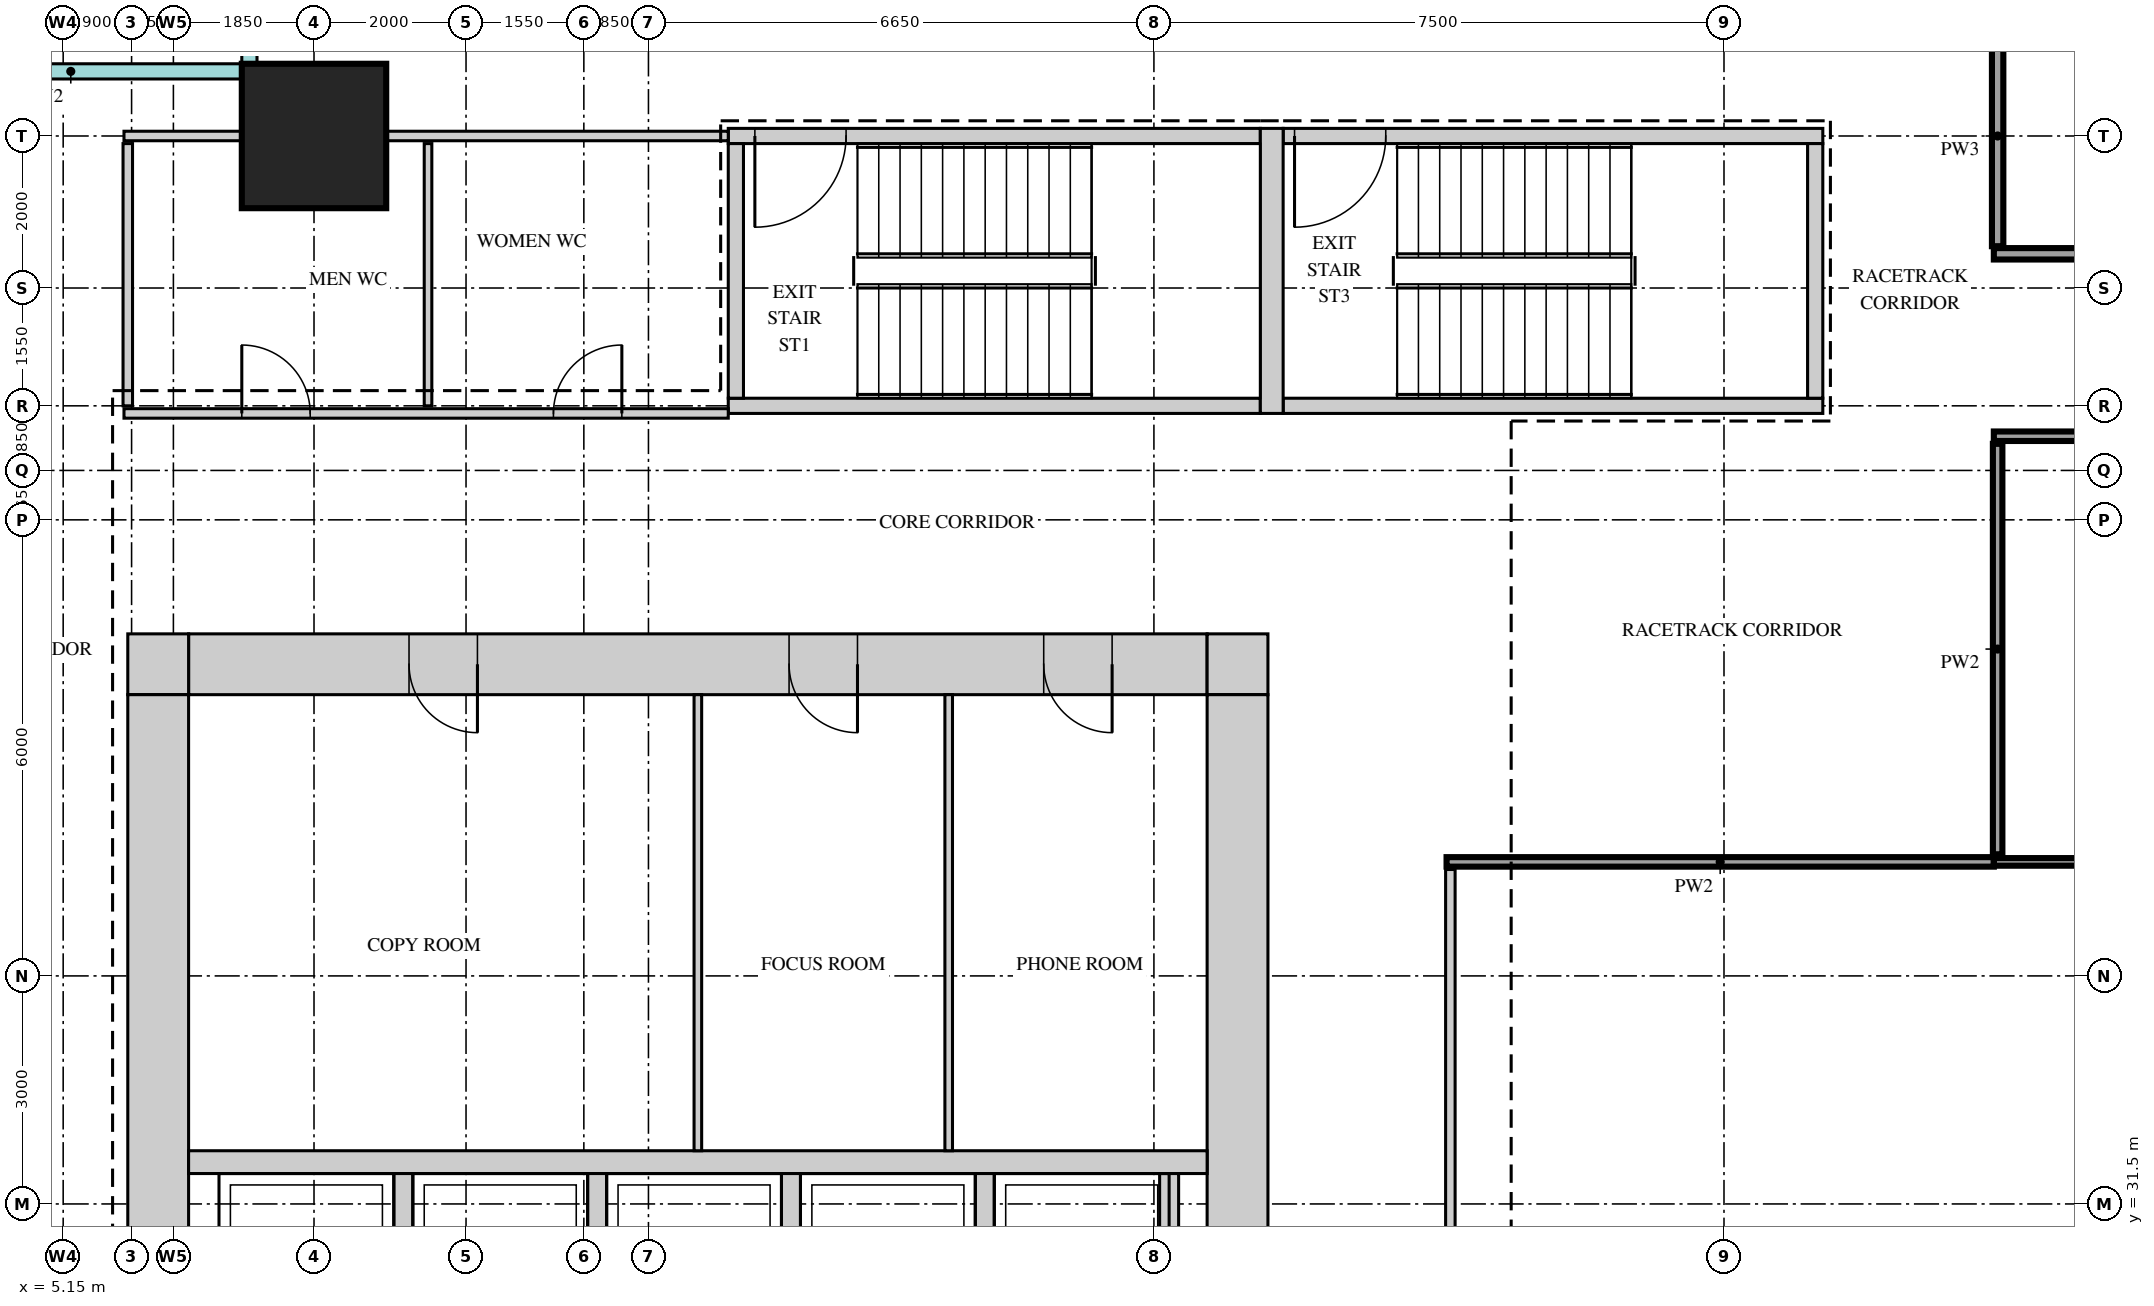
"""IFC4 building model, lengths in metres.
Left out: names, types, materials, properties, quantities, classifications, styles, units other than length and angle.
Written with IfcOpenShell. Run it as: python <this file> out.ifc"""

import sys

from ifc_helpers import new_model, si_unit, direction, frame, frame_2d, origin, origin_2d, place, context, subcontext, project, spatial, rectangle, extrude, source, transform, mapped, element, fill, save


model = new_model("IFC4")
c1 = context("Model", 3, precision=1e-05, world=origin(), true_north=direction((0.0, 1.0)))
c2 = subcontext(c1, "Body", "Model", "MODEL_VIEW")
j1 = project(units=[si_unit("LENGTHUNIT", "METRE"), si_unit("PLANEANGLEUNIT", "RADIAN")], contexts=[c1])
p1 = place(None, origin())
s1 = spatial("IfcSite", under=j1, at=p1, CompositionType="ELEMENT")
p2 = place(p1, origin())
s2 = spatial("IfcBuilding", under=s1, at=p2, CompositionType="ELEMENT")
p3 = place(p2, frame((0.0, 0.0, 208.7)))
s3 = spatial("IfcBuildingStorey", under=s2, at=p3, CompositionType="ELEMENT", Elevation=208.7)
m1 = source(origin(), c2, "Body", "SweptSolid", [
    extrude(rectangle(XDim=13.4, YDim=0.8, at=frame_2d((6.7, 0.0))), origin(), (0.0, 0.0, 1.0), 3.75),
])
p4 = place(p3, frame((6.8, 38.6, 0.0), z_axis=(0.0, 0.0, 1.0), x_axis=(1.0, 0.0, 0.0)))
e1 = element("IfcWall", 1, at=p4, inside=s3, PredefinedType="SHEAR", context=c2, shape_type="MappedRepresentation", body=[
    mapped(m1, transform((0.0, 0.0, 0.0))),
])
m2 = source(origin(), c2, "Body", "SweptSolid", [
    extrude(rectangle(XDim=0.9, YDim=2.1, at=frame_2d((0.45, 1.05))), frame((0.0, 0.41, 0.0), z_axis=(0.0, -1.0, 0.0), x_axis=(1.0, 0.0, 0.0)), (0.0, 0.0, 1.0), 0.82),
])
p5 = place(p4, frame((2.9, 0.0, 0.0)))
e2 = element("IfcOpeningElement", 2, at=p5, cuts=e1, PredefinedType="OPENING", context=c2, shape_type="MappedRepresentation", body=[
    mapped(m2, transform((0.0, 0.0, 0.0))),
])
p6 = place(p4, frame((7.9, 0.0, 0.0)))
e3 = element("IfcOpeningElement", 3, at=p6, cuts=e1, PredefinedType="OPENING", context=c2, shape_type="MappedRepresentation", body=[
    mapped(m2, transform((0.0, 0.0, 0.0))),
])
p7 = place(p4, frame((11.25, 0.0, 0.0)))
e4 = element("IfcOpeningElement", 4, at=p7, cuts=e1, PredefinedType="OPENING", context=c2, shape_type="MappedRepresentation", body=[
    mapped(m2, transform((0.0, 0.0, 0.0))),
])
m3 = source(origin(), c2, "Body", "SweptSolid", [
    extrude(rectangle(XDim=0.8, YDim=0.8, at=frame_2d((0.4, 0.0))), origin(), (0.0, 0.0, 1.0), 3.75),
])
for number, where, z_axis, x_axis in (
    (5, (20.2, 38.6, 0.0), (0.0, 0.0, 1.0), (1.0, 0.0, 0.0)),
    (6, (6.0, 38.6, 0.0), (0.0, 0.0, 1.0), (1.0, 0.0, 0.0)),
):
    element("IfcWall", number, at=place(p3, frame(where, z_axis=z_axis, x_axis=x_axis)), inside=s3, PredefinedType="SHEAR", context=c2, shape_type="MappedRepresentation", body=[
        mapped(m3, transform((0.0, 0.0, 0.0))),
    ])
m4 = source(origin(), c2, "Body", "SweptSolid", [
    extrude(rectangle(XDim=22.4, YDim=0.8, at=frame_2d((11.2, 0.0))), origin(), (0.0, 0.0, 1.0), 3.75),
])
p8 = place(p3, frame((20.6, 15.8, 0.0), z_axis=(0.0, 0.0, 1.0), x_axis=(0.0, 1.0, 0.0)))
e7 = element("IfcWall", 7, at=p8, inside=s3, PredefinedType="SHEAR", context=c2, shape_type="MappedRepresentation", body=[
    mapped(m4, transform((0.0, 0.0, 0.0))),
])
m5 = source(origin(), c2, "Body", "SweptSolid", [
    extrude(rectangle(XDim=1.8, YDim=2.1, at=frame_2d((0.9, 1.05))), frame((0.0, 0.41, 0.0), z_axis=(0.0, -1.0, 0.0), x_axis=(1.0, 0.0, 0.0)), (0.0, 0.0, 1.0), 0.82),
])
p9 = place(p8, frame((10.7, 0.0, 0.0)))
e8 = element("IfcOpeningElement", 8, at=p9, cuts=e7, PredefinedType="OPENING", context=c2, shape_type="MappedRepresentation", body=[
    mapped(m5, transform((0.0, 0.0, 0.0))),
])
p10 = place(p8, frame((0.35, 0.0, 0.0)))
e9 = element("IfcOpeningElement", 9, at=p10, cuts=e7, PredefinedType="OPENING", context=c2, shape_type="MappedRepresentation", body=[
    mapped(m2, transform((0.0, 0.0, 0.0))),
])
p11 = place(p8, frame((3.9, 0.0, 0.0)))
e10 = element("IfcOpeningElement", 10, at=p11, cuts=e7, PredefinedType="OPENING", context=c2, shape_type="MappedRepresentation", body=[
    mapped(m2, transform((0.0, 0.0, 0.0))),
])
p12 = place(p3, frame((6.4, 15.8, 0.0), z_axis=(0.0, 0.0, 1.0), x_axis=(0.0, 1.0, 0.0)))
e11 = element("IfcWall", 11, at=p12, inside=s3, PredefinedType="SHEAR", context=c2, shape_type="MappedRepresentation", body=[
    mapped(m4, transform((0.0, 0.0, 0.0))),
])
m6 = source(origin(), c2, "Body", "SweptSolid", [
    extrude(rectangle(XDim=7.0, YDim=0.2, at=frame_2d((3.5, 0.0))), origin(), (0.0, 0.0, 1.0), 3.75),
])
p13 = place(p3, frame((13.9, 45.55, 0.0), z_axis=(0.0, 0.0, 1.0), x_axis=(1.0, 0.0, 0.0)))
e12 = element("IfcWall", 12, at=p13, inside=s3, PredefinedType="SHEAR", context=c2, shape_type="MappedRepresentation", body=[
    mapped(m6, transform((0.0, 0.0, 0.0))),
])
m7 = source(origin(), c2, "Body", "SweptSolid", [
    extrude(rectangle(XDim=1.2, YDim=2.1, at=frame_2d((0.6, 1.05))), frame((0.0, 0.11, 0.0), z_axis=(0.0, -1.0, 0.0), x_axis=(1.0, 0.0, 0.0)), (0.0, 0.0, 1.0), 0.22),
])
p14 = place(p13, frame((0.35, 0.0, 0.0)))
e13 = element("IfcOpeningElement", 13, at=p14, cuts=e12, PredefinedType="OPENING", context=c2, shape_type="MappedRepresentation", body=[
    mapped(m7, transform((0.0, 0.0, 0.0))),
])
p15 = place(p3, frame((13.9, 42.0, 0.0), z_axis=(0.0, 0.0, 1.0), x_axis=(1.0, 0.0, 0.0)))
e14 = element("IfcWall", 14, at=p15, inside=s3, PredefinedType="SHEAR", context=c2, shape_type="MappedRepresentation", body=[
    mapped(m6, transform((0.0, 0.0, 0.0))),
])
m8 = source(origin(), c2, "Body", "SweptSolid", [
    extrude(rectangle(XDim=7.1, YDim=0.2, at=frame_2d((3.55, 0.0))), origin(), (0.0, 0.0, 1.0), 3.75),
])
p16 = place(p3, frame((21.2, 45.55, 0.0), z_axis=(0.0, 0.0, 1.0), x_axis=(1.0, 0.0, 0.0)))
e15 = element("IfcWall", 15, at=p16, inside=s3, PredefinedType="SHEAR", context=c2, shape_type="MappedRepresentation", body=[
    mapped(m8, transform((0.0, 0.0, 0.0))),
])
p17 = place(p16, frame((0.15, 0.0, 0.0)))
e16 = element("IfcOpeningElement", 16, at=p17, cuts=e15, PredefinedType="OPENING", context=c2, shape_type="MappedRepresentation", body=[
    mapped(m7, transform((0.0, 0.0, 0.0))),
])
p18 = place(p3, frame((21.2, 42.0, 0.0), z_axis=(0.0, 0.0, 1.0), x_axis=(1.0, 0.0, 0.0)))
e17 = element("IfcWall", 17, at=p18, inside=s3, PredefinedType="SHEAR", context=c2, shape_type="MappedRepresentation", body=[
    mapped(m8, transform((0.0, 0.0, 0.0))),
])
m9 = source(origin(), c2, "Body", "SweptSolid", [
    extrude(rectangle(XDim=3.75, YDim=0.3, at=frame_2d((1.875, 0.0))), origin(), (0.0, 0.0, 1.0), 3.75),
])
p19 = place(p3, frame((21.05, 41.9, 0.0), z_axis=(0.0, 0.0, 1.0), x_axis=(0.0, 1.0, 0.0)))
e18 = element("IfcWall", 18, at=p19, inside=s3, PredefinedType="SHEAR", context=c2, shape_type="MappedRepresentation", body=[
    mapped(m9, transform((0.0, 0.0, 0.0))),
])
m10 = source(origin(), c2, "Body", "SweptSolid", [
    extrude(rectangle(XDim=3.35, YDim=0.2, at=frame_2d((1.675, 0.0))), origin(), (0.0, 0.0, 1.0), 3.75),
])
for number, where, z_axis, x_axis in (
    (19, (14.0, 42.1, 0.0), (0.0, 0.0, 1.0), (0.0, 1.0, 0.0)),
    (20, (28.2, 42.1, 0.0), (0.0, 0.0, 1.0), (0.0, 1.0, 0.0)),
):
    element("IfcWall", number, at=place(p3, frame(where, z_axis=z_axis, x_axis=x_axis)), inside=s3, PredefinedType="SHEAR", context=c2, shape_type="MappedRepresentation", body=[
        mapped(m10, transform((0.0, 0.0, 0.0))),
    ])
m11 = source(origin(), c2, "Body", "SweptSolid", [
    extrude(rectangle(XDim=13.4, YDim=0.3, at=frame_2d((6.7, 0.0))), origin(), (0.0, 0.0, 1.0), 3.75),
])
p20 = place(p3, frame((6.8, 32.05, 0.0), z_axis=(0.0, 0.0, 1.0), x_axis=(1.0, 0.0, 0.0)))
e21 = element("IfcWall", 21, at=p20, inside=s3, PredefinedType="STANDARD", context=c2, shape_type="MappedRepresentation", body=[
    mapped(m11, transform((0.0, 0.0, 0.0))),
])
m12 = source(origin(), c2, "Body", "SweptSolid", [
    extrude(rectangle(XDim=2.4, YDim=0.25, at=frame_2d((1.2, 0.0))), origin(), (0.0, 0.0, 1.0), 3.75),
])
for number, where, z_axis, x_axis in (
    (22, (17.275, 29.5, 0.0), (0.0, 0.0, 1.0), (0.0, 1.0, 0.0)),
    (23, (19.7, 29.5, 0.0), (0.0, 0.0, 1.0), (0.0, 1.0, 0.0)),
    (24, (9.625, 29.5, 0.0), (0.0, 0.0, 1.0), (0.0, 1.0, 0.0)),
    (25, (12.175, 29.5, 0.0), (0.0, 0.0, 1.0), (0.0, 1.0, 0.0)),
    (26, (14.725, 29.5, 0.0), (0.0, 0.0, 1.0), (0.0, 1.0, 0.0)),
):
    element("IfcWall", number, at=place(p3, frame(where, z_axis=z_axis, x_axis=x_axis)), inside=s3, PredefinedType="STANDARD", context=c2, shape_type="MappedRepresentation", body=[
        mapped(m12, transform((0.0, 0.0, 0.0))),
    ])
m13 = source(origin(), c2, "Body", "SweptSolid", [
    extrude(rectangle(XDim=1.9, YDim=1.9, at=origin_2d()), origin(), (0.0, 0.0, 1.0), 4.0),
])
p21 = place(p3, frame((8.45, 45.55, 0.0), z_axis=(0.0, 0.0, 1.0), x_axis=(1.0, 0.0, 0.0)))
e27 = element("IfcColumn", 27, at=p21, inside=s3, PredefinedType="COLUMN", context=c2, shape_type="MappedRepresentation", body=[
    mapped(m13, transform((0.0, 0.0, 0.0))),
])
m14 = source(origin(), c2, "Body", "SweptSolid", [
    extrude(rectangle(XDim=23.4, YDim=0.125, at=frame_2d((11.7, 0.0))), origin(), (0.0, 0.0, 1.0), 3.8),
])
p22 = place(p3, frame((23.4, 12.5, 0.0), z_axis=(0.0, 0.0, 1.0), x_axis=(0.0, 1.0, 0.0)))
e28 = element("IfcWall", 28, at=p22, inside=s3, PredefinedType="PARTITIONING", context=c2, shape_type="MappedRepresentation", body=[
    mapped(m14, transform((0.0, 0.0, 0.0))),
])
m15 = source(origin(), c2, "Body", "SweptSolid", [
    extrude(rectangle(XDim=1.2, YDim=2.1, at=frame_2d((0.6, 1.05))), frame((0.0, 0.073, 0.0), z_axis=(0.0, -1.0, 0.0), x_axis=(1.0, 0.0, 0.0)), (0.0, 0.0, 1.0), 0.145),
])
p23 = place(p22, frame((11.1, 0.0, 0.0)))
e29 = element("IfcOpeningElement", 29, at=p23, cuts=e28, PredefinedType="OPENING", context=c2, shape_type="MappedRepresentation", body=[
    mapped(m15, transform((0.0, 0.0, 0.0))),
])
m16 = source(origin(), c2, "Body", "SweptSolid", [
    extrude(rectangle(XDim=6.0, YDim=0.1, at=frame_2d((3.0, 0.0))), origin(), (0.0, 0.0, 1.0), 3.8),
])
for number, where, z_axis, x_axis in (
    (30, (13.5, 32.2, 0.0), (0.0, 0.0, 1.0), (0.0, 1.0, 0.0)),
    (31, (16.8, 32.2, 0.0), (0.0, 0.0, 1.0), (0.0, 1.0, 0.0)),
):
    element("IfcWall", number, at=place(p3, frame(where, z_axis=z_axis, x_axis=x_axis)), inside=s3, PredefinedType="PARTITIONING", context=c2, shape_type="MappedRepresentation", body=[
        mapped(m16, transform((0.0, 0.0, 0.0))),
    ])
m17 = source(origin(), c2, "Body", "SweptSolid", [
    extrude(rectangle(XDim=7.2, YDim=0.125, at=frame_2d((3.6, 0.0))), origin(), (0.0, 0.0, 1.0), 3.8),
])
p24 = place(p3, frame((23.35, 36.0, 0.0), z_axis=(0.0, 0.0, 1.0), x_axis=(1.0, 0.0, 0.0)))
e32 = element("IfcWall", 32, at=p24, inside=s3, PredefinedType="PARTITIONING", context=c2, shape_type="MappedRepresentation", body=[
    mapped(m17, transform((0.0, 0.0, 0.0))),
])
m18 = source(origin(), c2, "Body", "SweptSolid", [
    extrude(rectangle(XDim=10.95, YDim=0.1, at=frame_2d((5.475, 0.0))), origin(), (0.0, 0.0, 1.0), 3.8),
])
p25 = place(p3, frame((30.55, 36.0, 0.0), z_axis=(0.0, 0.0, 1.0), x_axis=(1.0, 0.0, 0.0)))
e33 = element("IfcWall", 33, at=p25, inside=s3, PredefinedType="PARTITIONING", context=c2, shape_type="MappedRepresentation", body=[
    mapped(m18, transform((0.0, 0.0, 0.0))),
])
m19 = source(origin(), c2, "Body", "SweptSolid", [
    extrude(rectangle(XDim=5.4, YDim=0.125, at=frame_2d((2.7, 0.0))), origin(), (0.0, 0.0, 1.0), 3.8),
])
p26 = place(p3, frame((30.6, 36.1, 0.0), z_axis=(0.0, 0.0, 1.0), x_axis=(0.0, 1.0, 0.0)))
e34 = element("IfcWall", 34, at=p26, inside=s3, PredefinedType="PARTITIONING", context=c2, shape_type="MappedRepresentation", body=[
    mapped(m19, transform((0.0, 0.0, 0.0))),
])
m20 = source(origin(), c2, "Body", "SweptSolid", [
    extrude(rectangle(XDim=11.1, YDim=0.125, at=frame_2d((5.55, 0.0))), origin(), (0.0, 0.0, 1.0), 3.8),
])
p27 = place(p3, frame((30.55, 41.6, 0.0), z_axis=(0.0, 0.0, 1.0), x_axis=(1.0, 0.0, 0.0)))
e35 = element("IfcWall", 35, at=p27, inside=s3, PredefinedType="PARTITIONING", context=c2, shape_type="MappedRepresentation", body=[
    mapped(m20, transform((0.0, 0.0, 0.0))),
])
m21 = source(origin(), c2, "Body", "SweptSolid", [
    extrude(rectangle(XDim=7.95, YDim=0.125, at=frame_2d((3.975, 0.0))), origin(), (0.0, 0.0, 1.0), 3.8),
])
p28 = place(p3, frame((5.95, 41.9, 0.0), z_axis=(0.0, 0.0, 1.0), x_axis=(1.0, 0.0, 0.0)))
e36 = element("IfcWall", 36, at=p28, inside=s3, PredefinedType="PARTITIONING", context=c2, shape_type="MappedRepresentation", body=[
    mapped(m21, transform((0.0, 0.0, 0.0))),
])
m22 = source(origin(), c2, "Body", "SweptSolid", [
    extrude(rectangle(XDim=0.9, YDim=2.1, at=frame_2d((0.45, 1.05))), frame((0.0, 0.073, 0.0), z_axis=(0.0, -1.0, 0.0), x_axis=(1.0, 0.0, 0.0)), (0.0, 0.0, 1.0), 0.145),
])
p29 = place(p28, frame((1.55, 0.0, 0.0)))
e37 = element("IfcOpeningElement", 37, at=p29, cuts=e36, PredefinedType="OPENING", context=c2, shape_type="MappedRepresentation", body=[
    mapped(m22, transform((0.0, 0.0, 0.0))),
])
p30 = place(p28, frame((5.65, 0.0, 0.0)))
e38 = element("IfcOpeningElement", 38, at=p30, cuts=e36, PredefinedType="OPENING", context=c2, shape_type="MappedRepresentation", body=[
    mapped(m22, transform((0.0, 0.0, 0.0))),
])
m23 = source(origin(), c2, "Body", "SweptSolid", [
    extrude(rectangle(XDim=3.45, YDim=0.125, at=frame_2d((1.725, 0.0))), origin(), (0.0, 0.0, 1.0), 3.8),
])
p31 = place(p3, frame((6.0, 42.0, 0.0), z_axis=(0.0, 0.0, 1.0), x_axis=(0.0, 1.0, 0.0)))
e39 = element("IfcWall", 39, at=p31, inside=s3, PredefinedType="PARTITIONING", context=c2, shape_type="MappedRepresentation", body=[
    mapped(m23, transform((0.0, 0.0, 0.0))),
])
m24 = source(origin(), c2, "Body", "SweptSolid", [
    extrude(rectangle(XDim=3.45, YDim=0.1, at=frame_2d((1.725, 0.0))), origin(), (0.0, 0.0, 1.0), 3.8),
])
p32 = place(p3, frame((9.95, 42.0, 0.0), z_axis=(0.0, 0.0, 1.0), x_axis=(0.0, 1.0, 0.0)))
e40 = element("IfcWall", 40, at=p32, inside=s3, PredefinedType="PARTITIONING", context=c2, shape_type="MappedRepresentation", body=[
    mapped(m24, transform((0.0, 0.0, 0.0))),
])
m25 = source(origin(), c2, "Body", "SweptSolid", [
    extrude(rectangle(XDim=11.4, YDim=0.15, at=frame_2d((5.7, 0.0))), origin(), (0.0, 0.0, 1.0), 3.8),
])
p33 = place(p3, frame((30.55, 44.0, 0.0), z_axis=(0.0, 0.0, 1.0), x_axis=(1.0, 0.0, 0.0)))
e41 = element("IfcWall", 41, at=p33, inside=s3, PredefinedType="PARTITIONING", context=c2, shape_type="MappedRepresentation", body=[
    mapped(m25, transform((0.0, 0.0, 0.0))),
])
m26 = source(origin(), c2, "Body", "SweptSolid", [
    extrude(rectangle(XDim=0.9, YDim=2.1, at=frame_2d((0.45, 1.05))), frame((0.0, 0.085, 0.0), z_axis=(0.0, -1.0, 0.0), x_axis=(1.0, 0.0, 0.0)), (0.0, 0.0, 1.0), 0.17),
])
p34 = place(p33, frame((5.3, 0.0, 0.0)))
e42 = element("IfcOpeningElement", 42, at=p34, cuts=e41, PredefinedType="OPENING", context=c2, shape_type="MappedRepresentation", body=[
    mapped(m26, transform((0.0, 0.0, 0.0))),
])
m27 = source(origin(), c2, "Body", "SweptSolid", [
    extrude(rectangle(XDim=2.9, YDim=0.15, at=frame_2d((1.45, 0.0))), origin(), (0.0, 0.0, 1.0), 3.8),
])
p35 = place(p3, frame((30.6, 44.1, 0.0), z_axis=(0.0, 0.0, 1.0), x_axis=(0.0, 1.0, 0.0)))
e43 = element("IfcWall", 43, at=p35, inside=s3, PredefinedType="PARTITIONING", context=c2, shape_type="MappedRepresentation", body=[
    mapped(m27, transform((0.0, 0.0, 0.0))),
])
m28 = source(origin(), c2, "Body", "SweptSolid", [
    extrude(rectangle(XDim=7.95, YDim=0.125, at=frame_2d((3.975, 0.0))), origin(), (0.0, 0.0, 1.0), 3.25),
])
p36 = place(p3, frame((5.95, 45.55, 0.0), z_axis=(0.0, 0.0, 1.0), x_axis=(1.0, 0.0, 0.0)))
e44 = element("IfcWall", 44, at=p36, inside=s3, PredefinedType="PARTITIONING", context=c2, shape_type="MappedRepresentation", body=[
    mapped(m28, transform((0.0, 0.0, 0.0))),
])
m29 = source(origin(), c2, "Body", "SweptSolid", [
    extrude(rectangle(XDim=0.9, YDim=2.1, at=frame_2d((0.45, 1.05))), frame((0.0, 0.35, 0.0), z_axis=(0.0, -1.0, 0.0), x_axis=(1.0, 0.0, 0.0)), (0.0, 0.0, 1.0), 0.7),
])
p37 = place(p5, origin())
e45 = element("IfcDoor", 45, at=p37, inside=s3, OperationType="SINGLE_SWING_RIGHT", PredefinedType="DOOR", context=c2, shape_type="MappedRepresentation", body=[
    mapped(m29, transform((0.0, 0.0, 0.0))),
])
fill(e2, e45)
p38 = place(p6, origin())
e46 = element("IfcDoor", 46, at=p38, inside=s3, OperationType="SINGLE_SWING_RIGHT", PredefinedType="DOOR", context=c2, shape_type="MappedRepresentation", body=[
    mapped(m29, transform((0.0, 0.0, 0.0))),
])
fill(e3, e46)
p39 = place(p7, origin())
e47 = element("IfcDoor", 47, at=p39, inside=s3, OperationType="SINGLE_SWING_RIGHT", PredefinedType="DOOR", context=c2, shape_type="MappedRepresentation", body=[
    mapped(m29, transform((0.0, 0.0, 0.0))),
])
fill(e4, e47)
m30 = source(origin(), c2, "Body", "SweptSolid", [
    extrude(rectangle(XDim=0.9, YDim=2.1, at=frame_2d((0.45, 1.05))), frame((0.0, 0.025, 0.0), z_axis=(0.0, -1.0, 0.0), x_axis=(1.0, 0.0, 0.0)), (0.0, 0.0, 1.0), 0.05),
])
p40 = place(p29, origin())
e48 = element("IfcDoor", 48, at=p40, inside=s3, OperationType="SINGLE_SWING_RIGHT", PredefinedType="DOOR", context=c2, shape_type="MappedRepresentation", body=[
    mapped(m30, transform((0.0, 0.0, 0.0))),
])
fill(e37, e48)
p41 = place(p30, origin())
e49 = element("IfcDoor", 49, at=p41, inside=s3, OperationType="SINGLE_SWING_LEFT", PredefinedType="DOOR", context=c2, shape_type="MappedRepresentation", body=[
    mapped(m30, transform((0.0, 0.0, 0.0))),
])
fill(e38, e49)
m31 = source(origin(), c2, "Body", "SweptSolid", [
    extrude(rectangle(XDim=1.2, YDim=2.1, at=frame_2d((0.6, 1.05))), frame((0.0, 0.025, 0.0), z_axis=(0.0, -1.0, 0.0), x_axis=(1.0, 0.0, 0.0)), (0.0, 0.0, 1.0), 0.05),
])
p42 = place(p14, origin())
e50 = element("IfcDoor", 50, at=p42, inside=s3, OperationType="SINGLE_SWING_LEFT", PredefinedType="DOOR", context=c2, shape_type="MappedRepresentation", body=[
    mapped(m31, transform((0.0, 0.0, 0.0))),
])
fill(e13, e50)
p43 = place(p17, origin())
e51 = element("IfcDoor", 51, at=p43, inside=s3, OperationType="SINGLE_SWING_LEFT", PredefinedType="DOOR", context=c2, shape_type="MappedRepresentation", body=[
    mapped(m31, transform((0.0, 0.0, 0.0))),
])
fill(e16, e51)
save(model, sys.argv[1])
